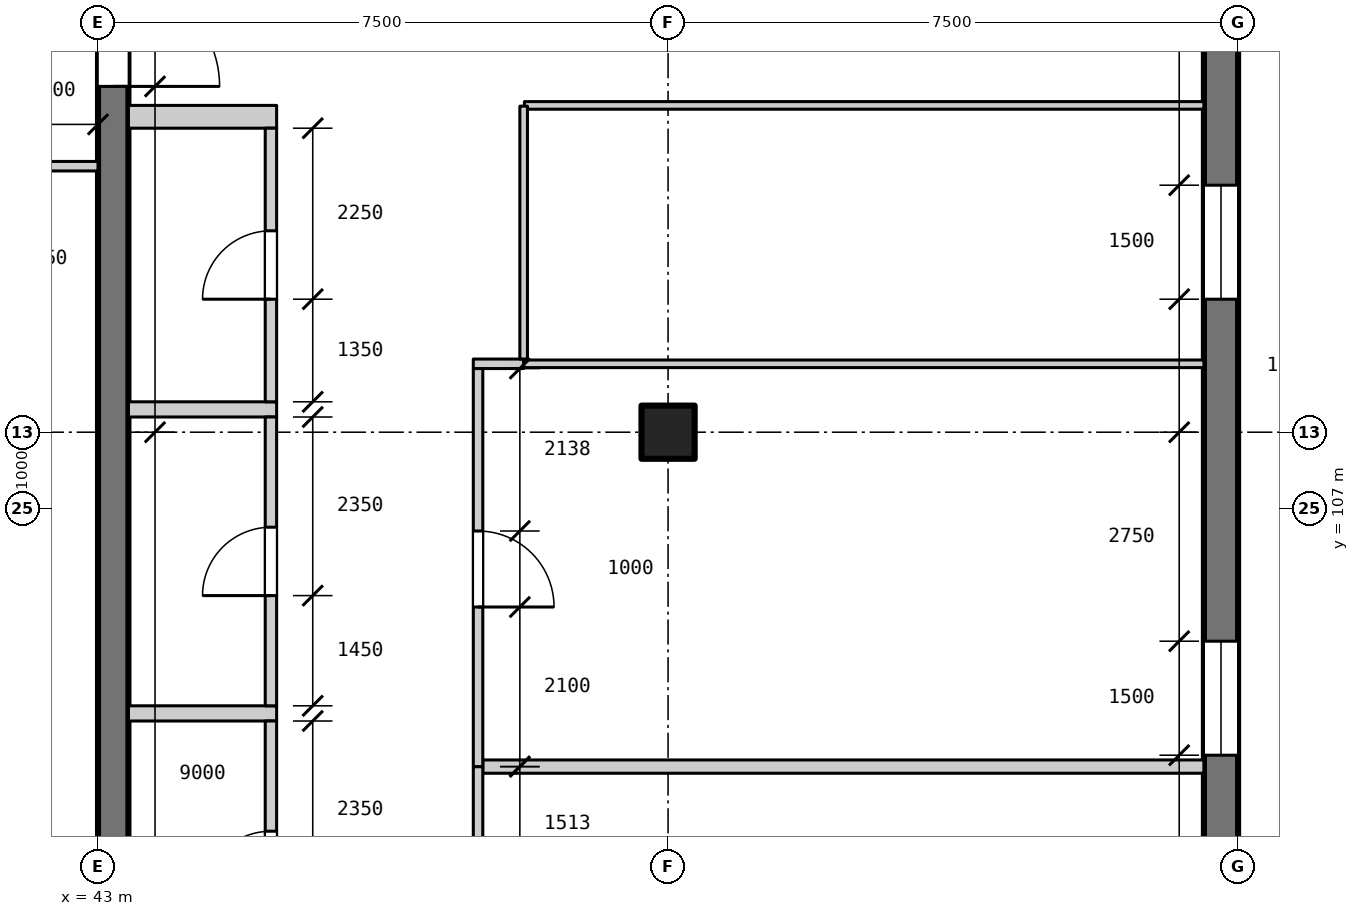
"""IFC4 building model, lengths in metres.
Left out: names, types, materials, properties, quantities, classifications, styles, units other than length and angle.
Written with IfcOpenShell. Run it as: python <this file> out.ifc"""

import sys

from ifc_helpers import new_model, si_unit, direction, frame, frame_2d, origin, origin_2d, place, context, subcontext, project, spatial, rectangle, extrude, element, fill, save


model = new_model("IFC4")
c1 = context("Model", 3, precision=1e-05, world=origin(), true_north=direction((0.0, 1.0)))
c2 = subcontext(c1, "Body", "Model", "MODEL_VIEW")
j1 = project(units=[si_unit("LENGTHUNIT", "METRE"), si_unit("PLANEANGLEUNIT", "RADIAN")], contexts=[c1])
p1 = place(None, origin())
s1 = spatial("IfcSite", under=j1, at=p1, CompositionType="ELEMENT")
p2 = place(p1, origin())
s2 = spatial("IfcBuilding", under=s1, at=p2, CompositionType="ELEMENT")
p3 = place(p2, frame((0.0, 0.0, 6.0)))
s3 = spatial("IfcBuildingStorey", under=s2, at=p3, CompositionType="ELEMENT", Elevation=6.0)
p4 = place(p3, frame((50.5, 108.0, 0.0), z_axis=(0.0, 0.0, 1.0), x_axis=(1.0, 0.0, 0.0)))
e1 = element("IfcColumn", 1, at=p4, inside=s3, PredefinedType="COLUMN", context=c2, shape_type="SweptSolid", body=[
    extrude(rectangle(XDim=0.7, YDim=0.7, at=origin_2d()), origin(), (0.0, 0.0, 1.0), 3.9),
])
p5 = place(p3, frame((43.2, 99.0, 0.0), z_axis=(0.0, 0.0, 1.0), x_axis=(0.0, 1.0, 0.0)))
e2 = element("IfcWall", 2, at=p5, inside=s3, PredefinedType="SHEAR", context=c2, shape_type="SweptSolid", body=[
    extrude(rectangle(XDim=26.55, YDim=0.4, at=frame_2d((13.275, 0.0))), origin(), (0.0, 0.0, 1.0), 4.2),
])
p6 = place(p5, frame((13.55, 0.0, 0.0)))
e3 = element("IfcOpeningElement", 3, at=p6, cuts=e2, PredefinedType="OPENING", context=c2, shape_type="SweptSolid", body=[
    extrude(rectangle(XDim=1.4, YDim=2.4, at=frame_2d((0.7, 1.2))), frame((0.0, 0.21, 0.0), z_axis=(0.0, -1.0, 0.0), x_axis=(1.0, 0.0, 0.0)), (0.0, 0.0, 1.0), 0.42),
])
p7 = place(p3, frame((57.775, 126.0, 0.0), z_axis=(0.0, 0.0, 1.0), x_axis=(0.0, -1.0, 0.0)))
e4 = element("IfcWall", 4, at=p7, inside=s3, PredefinedType="SOLIDWALL", context=c2, shape_type="SweptSolid", body=[
    extrude(rectangle(XDim=27.0, YDim=0.45, at=frame_2d((13.5, 0.0))), origin(), (0.0, 0.0, 1.0), 3.9),
])
p8 = place(p7, frame((20.75, 0.0, 0.8)))
e5 = element("IfcOpeningElement", 5, at=p8, cuts=e4, PredefinedType="OPENING", context=c2, shape_type="SweptSolid", body=[
    extrude(rectangle(XDim=1.5, YDim=2.2, at=frame_2d((0.75, 1.1))), frame((0.0, 0.235, 0.0), z_axis=(0.0, -1.0, 0.0), x_axis=(1.0, 0.0, 0.0)), (0.0, 0.0, 1.0), 0.47),
])
p9 = place(p7, frame((14.75, 0.0, 0.8)))
e6 = element("IfcOpeningElement", 6, at=p9, cuts=e4, PredefinedType="OPENING", context=c2, shape_type="SweptSolid", body=[
    extrude(rectangle(XDim=1.5, YDim=2.2, at=frame_2d((0.75, 1.1))), frame((0.0, 0.235, 0.0), z_axis=(0.0, -1.0, 0.0), x_axis=(1.0, 0.0, 0.0)), (0.0, 0.0, 1.0), 0.47),
])
for number, where, z_axis, x_axis in (
    (7, (43.4, 104.3, 0.0), (0.0, 0.0, 1.0), (1.0, 0.0, 0.0)),
    (8, (43.4, 108.3, 0.0), (0.0, 0.0, 1.0), (1.0, 0.0, 0.0)),
):
    element("IfcWall", number, at=place(p3, frame(where, z_axis=z_axis, x_axis=x_axis)), inside=s3, PredefinedType="PARTITIONING", context=c2, shape_type="SweptSolid", body=[
        extrude(rectangle(XDim=1.95, YDim=0.2, at=frame_2d((0.975, 0.0))), origin(), (0.0, 0.0, 1.0), 3.9),
    ])
p10 = place(p3, frame((43.4, 112.15, 0.0), z_axis=(0.0, 0.0, 1.0), x_axis=(1.0, 0.0, 0.0)))
e9 = element("IfcWall", 9, at=p10, inside=s3, PredefinedType="PARTITIONING", context=c2, shape_type="SweptSolid", body=[
    extrude(rectangle(XDim=1.95, YDim=0.3, at=frame_2d((0.975, 0.0))), origin(), (0.0, 0.0, 1.0), 3.9),
])
p11 = place(p3, frame((45.275, 100.4, 0.0), z_axis=(0.0, 0.0, 1.0), x_axis=(0.0, 1.0, 0.0)))
e10 = element("IfcWall", 10, at=p11, inside=s3, PredefinedType="PARTITIONING", context=c2, shape_type="SweptSolid", body=[
    extrude(rectangle(XDim=3.8, YDim=0.15, at=frame_2d((1.9, 0.0))), origin(), (0.0, 0.0, 1.0), 3.9),
])
p12 = place(p11, frame((1.45, 0.0, 0.0)))
e11 = element("IfcOpeningElement", 11, at=p12, cuts=e10, PredefinedType="OPENING", context=c2, shape_type="SweptSolid", body=[
    extrude(rectangle(XDim=0.9, YDim=2.1, at=frame_2d((0.45, 1.05))), frame((0.0, 0.085, 0.0), z_axis=(0.0, -1.0, 0.0), x_axis=(1.0, 0.0, 0.0)), (0.0, 0.0, 1.0), 0.17),
])
p13 = place(p3, frame((45.275, 104.4, 0.0), z_axis=(0.0, 0.0, 1.0), x_axis=(0.0, 1.0, 0.0)))
e12 = element("IfcWall", 12, at=p13, inside=s3, PredefinedType="PARTITIONING", context=c2, shape_type="SweptSolid", body=[
    extrude(rectangle(XDim=3.8, YDim=0.15, at=frame_2d((1.9, 0.0))), origin(), (0.0, 0.0, 1.0), 3.9),
])
p14 = place(p13, frame((1.45, 0.0, 0.0)))
e13 = element("IfcOpeningElement", 13, at=p14, cuts=e12, PredefinedType="OPENING", context=c2, shape_type="SweptSolid", body=[
    extrude(rectangle(XDim=0.9, YDim=2.1, at=frame_2d((0.45, 1.05))), frame((0.0, 0.085, 0.0), z_axis=(0.0, -1.0, 0.0), x_axis=(1.0, 0.0, 0.0)), (0.0, 0.0, 1.0), 0.17),
])
p15 = place(p3, frame((45.275, 108.4, 0.0), z_axis=(0.0, 0.0, 1.0), x_axis=(0.0, 1.0, 0.0)))
e14 = element("IfcWall", 14, at=p15, inside=s3, PredefinedType="PARTITIONING", context=c2, shape_type="SweptSolid", body=[
    extrude(rectangle(XDim=3.6, YDim=0.15, at=frame_2d((1.8, 0.0))), origin(), (0.0, 0.0, 1.0), 3.9),
])
p16 = place(p15, frame((1.35, 0.0, 0.0)))
e15 = element("IfcOpeningElement", 15, at=p16, cuts=e14, PredefinedType="OPENING", context=c2, shape_type="SweptSolid", body=[
    extrude(rectangle(XDim=0.9, YDim=2.1, at=frame_2d((0.45, 1.05))), frame((0.0, 0.085, 0.0), z_axis=(0.0, -1.0, 0.0), x_axis=(1.0, 0.0, 0.0)), (0.0, 0.0, 1.0), 0.17),
])
p17 = place(p3, frame((48.062, 103.6, 0.0), z_axis=(0.0, 0.0, 1.0), x_axis=(1.0, 0.0, 0.0)))
e16 = element("IfcWall", 16, at=p17, inside=s3, PredefinedType="PARTITIONING", context=c2, shape_type="SweptSolid", body=[
    extrude(rectangle(XDim=9.488, YDim=0.175, at=frame_2d((4.744, 0.0))), origin(), (0.0, 0.0, 1.0), 3.9),
])
p18 = place(p3, frame((47.938, 108.9, 0.0), z_axis=(0.0, 0.0, 1.0), x_axis=(1.0, 0.0, 0.0)))
e17 = element("IfcWall", 17, at=p18, inside=s3, PredefinedType="PARTITIONING", context=c2, shape_type="SweptSolid", body=[
    extrude(rectangle(XDim=0.663, YDim=0.125, at=frame_2d((0.331, 0.0))), origin(), (0.0, 0.0, 1.0), 3.9),
])
p19 = place(p3, frame((48.6, 108.9, 0.0), z_axis=(0.0, 0.0, 1.0), x_axis=(1.0, 0.0, 0.0)))
e18 = element("IfcWall", 18, at=p19, inside=s3, PredefinedType="PARTITIONING", context=c2, shape_type="SweptSolid", body=[
    extrude(rectangle(XDim=8.95, YDim=0.1, at=frame_2d((4.475, 0.0))), origin(), (0.0, 0.0, 1.0), 3.9),
])
p20 = place(p3, frame((29.0, 111.5, 0.0), z_axis=(0.0, 0.0, 1.0), x_axis=(1.0, 0.0, 0.0)))
e19 = element("IfcWall", 19, at=p20, inside=s3, PredefinedType="PARTITIONING", context=c2, shape_type="SweptSolid", body=[
    extrude(rectangle(XDim=14.0, YDim=0.125, at=frame_2d((7.0, 0.0))), origin(), (0.0, 0.0, 1.0), 3.9),
])
p21 = place(p20, frame((1.2, 0.0, 0.0)))
e20 = element("IfcOpeningElement", 20, at=p21, cuts=e19, PredefinedType="OPENING", context=c2, shape_type="SweptSolid", body=[
    extrude(rectangle(XDim=1.8, YDim=2.1, at=frame_2d((0.9, 1.05))), frame((0.0, 0.073, 0.0), z_axis=(0.0, -1.0, 0.0), x_axis=(1.0, 0.0, 0.0)), (0.0, 0.0, 1.0), 0.145),
])
p22 = place(p20, frame((11.0, 0.0, 0.0)))
e21 = element("IfcOpeningElement", 21, at=p22, cuts=e19, PredefinedType="OPENING", context=c2, shape_type="SweptSolid", body=[
    extrude(rectangle(XDim=1.8, YDim=2.1, at=frame_2d((0.9, 1.05))), frame((0.0, 0.073, 0.0), z_axis=(0.0, -1.0, 0.0), x_axis=(1.0, 0.0, 0.0)), (0.0, 0.0, 1.0), 0.145),
])
p23 = place(p3, frame((48.61, 112.3, 0.0), z_axis=(0.0, 0.0, 1.0), x_axis=(1.0, 0.0, 0.0)))
e22 = element("IfcWall", 22, at=p23, inside=s3, PredefinedType="PARTITIONING", context=c2, shape_type="SweptSolid", body=[
    extrude(rectangle(XDim=8.94, YDim=0.1, at=frame_2d((4.47, 0.0))), origin(), (0.0, 0.0, 1.0), 3.9),
])
p24 = place(p3, frame((48.0, 99.538, 0.0), z_axis=(0.0, 0.0, 1.0), x_axis=(0.0, 1.0, 0.0)))
e23 = element("IfcWall", 23, at=p24, inside=s3, PredefinedType="PARTITIONING", context=c2, shape_type="SweptSolid", body=[
    extrude(rectangle(XDim=4.062, YDim=0.125, at=frame_2d((2.031, 0.0))), origin(), (0.0, 0.0, 1.0), 3.9),
])
p25 = place(p24, frame((1.55, 0.0, 0.0)))
e24 = element("IfcOpeningElement", 24, at=p25, cuts=e23, PredefinedType="OPENING", context=c2, shape_type="SweptSolid", body=[
    extrude(rectangle(XDim=1.0, YDim=2.1, at=frame_2d((0.5, 1.05))), frame((0.0, 0.073, 0.0), z_axis=(0.0, -1.0, 0.0), x_axis=(1.0, 0.0, 0.0)), (0.0, 0.0, 1.0), 0.145),
])
p26 = place(p3, frame((48.0, 103.6, 0.0), z_axis=(0.0, 0.0, 1.0), x_axis=(0.0, 1.0, 0.0)))
e25 = element("IfcWall", 25, at=p26, inside=s3, PredefinedType="PARTITIONING", context=c2, shape_type="SweptSolid", body=[
    extrude(rectangle(XDim=5.237, YDim=0.125, at=frame_2d((2.619, 0.0))), origin(), (0.0, 0.0, 1.0), 3.9),
])
p27 = place(p26, frame((2.1, 0.0, 0.0)))
e26 = element("IfcOpeningElement", 26, at=p27, cuts=e25, PredefinedType="OPENING", context=c2, shape_type="SweptSolid", body=[
    extrude(rectangle(XDim=1.0, YDim=2.1, at=frame_2d((0.5, 1.05))), frame((0.0, 0.073, 0.0), z_axis=(0.0, -1.0, 0.0), x_axis=(1.0, 0.0, 0.0)), (0.0, 0.0, 1.0), 0.145),
])
p28 = place(p3, frame((48.6, 108.962, 0.0), z_axis=(0.0, 0.0, 1.0), x_axis=(0.0, 1.0, 0.0)))
e27 = element("IfcWall", 27, at=p28, inside=s3, PredefinedType="PARTITIONING", context=c2, shape_type="SweptSolid", body=[
    extrude(rectangle(XDim=3.328, YDim=0.1, at=frame_2d((1.664, 0.0))), origin(), (0.0, 0.0, 1.0), 3.9),
])
p29 = place(p8, origin())
e28 = element("IfcWindow", 28, at=p29, inside=s3, PartitioningType="SINGLE_PANEL", PredefinedType="WINDOW", context=c2, shape_type="SweptSolid", body=[
    extrude(rectangle(XDim=1.5, YDim=2.2, at=frame_2d((0.75, 1.1))), frame((0.0, -0.075, 0.0), z_axis=(0.0, -1.0, 0.0), x_axis=(1.0, 0.0, 0.0)), (0.0, 0.0, 1.0), 0.06),
])
fill(e5, e28)
p30 = place(p9, origin())
e29 = element("IfcWindow", 29, at=p30, inside=s3, PartitioningType="SINGLE_PANEL", PredefinedType="WINDOW", context=c2, shape_type="SweptSolid", body=[
    extrude(rectangle(XDim=1.5, YDim=2.2, at=frame_2d((0.75, 1.1))), frame((0.0, -0.075, 0.0), z_axis=(0.0, -1.0, 0.0), x_axis=(1.0, 0.0, 0.0)), (0.0, 0.0, 1.0), 0.06),
])
fill(e6, e29)
p31 = place(p12, origin())
e30 = element("IfcDoor", 30, at=p31, inside=s3, OperationType="SINGLE_SWING_LEFT", PredefinedType="DOOR", context=c2, shape_type="SweptSolid", body=[
    extrude(rectangle(XDim=0.9, YDim=2.1, at=frame_2d((0.45, 1.05))), frame((0.0, 0.025, 0.0), z_axis=(0.0, -1.0, 0.0), x_axis=(1.0, 0.0, 0.0)), (0.0, 0.0, 1.0), 0.05),
])
fill(e11, e30)
p32 = place(p27, frame((1.0, 0.0, 0.0), z_axis=(0.0, 0.0, 1.0), x_axis=(-1.0, 0.0, 0.0)))
e31 = element("IfcDoor", 31, at=p32, inside=s3, OperationType="SINGLE_SWING_RIGHT", PredefinedType="DOOR", context=c2, shape_type="SweptSolid", body=[
    extrude(rectangle(XDim=1.0, YDim=2.1, at=frame_2d((0.5, 1.05))), frame((0.0, 0.025, 0.0), z_axis=(0.0, -1.0, 0.0), x_axis=(1.0, 0.0, 0.0)), (0.0, 0.0, 1.0), 0.05),
])
fill(e26, e31)
p33 = place(p14, origin())
e32 = element("IfcDoor", 32, at=p33, inside=s3, OperationType="SINGLE_SWING_LEFT", PredefinedType="DOOR", context=c2, shape_type="SweptSolid", body=[
    extrude(rectangle(XDim=0.9, YDim=2.1, at=frame_2d((0.45, 1.05))), frame((0.0, 0.025, 0.0), z_axis=(0.0, -1.0, 0.0), x_axis=(1.0, 0.0, 0.0)), (0.0, 0.0, 1.0), 0.05),
])
fill(e13, e32)
p34 = place(p16, origin())
e33 = element("IfcDoor", 33, at=p34, inside=s3, OperationType="SINGLE_SWING_LEFT", PredefinedType="DOOR", context=c2, shape_type="SweptSolid", body=[
    extrude(rectangle(XDim=0.9, YDim=2.1, at=frame_2d((0.45, 1.05))), frame((0.0, 0.025, 0.0), z_axis=(0.0, -1.0, 0.0), x_axis=(1.0, 0.0, 0.0)), (0.0, 0.0, 1.0), 0.05),
])
fill(e15, e33)
p35 = place(p6, frame((1.4, 0.0, 0.0), z_axis=(0.0, 0.0, 1.0), x_axis=(-1.0, 0.0, 0.0)))
e34 = element("IfcDoor", 34, at=p35, inside=s3, OperationType="SINGLE_SWING_RIGHT", PredefinedType="DOOR", context=c2, shape_type="SweptSolid", body=[
    extrude(rectangle(XDim=1.4, YDim=2.4, at=frame_2d((0.7, 1.2))), frame((0.0, 0.025, 0.0), z_axis=(0.0, -1.0, 0.0), x_axis=(1.0, 0.0, 0.0)), (0.0, 0.0, 1.0), 0.05),
])
fill(e3, e34)
save(model, sys.argv[1])
